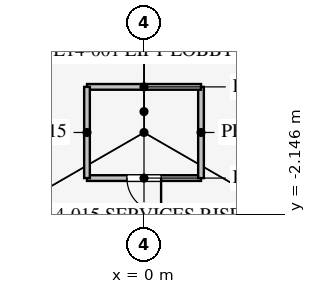
"""IFC4 building model, lengths in metres.
Left out: names, types, materials, properties, quantities, classifications, styles, units other than length and angle.
Written with IfcOpenShell. Run it as: python <this file> out.ifc"""

import sys

from ifc_helpers import new_model, si_unit, direction, frame, frame_2d, origin, place, context, subcontext, project, spatial, rectangle, extrude, element, fill, save


model = new_model("IFC4")
c1 = context("Model", 3, precision=1e-05, world=origin(), true_north=direction((0.0, 1.0)))
c2 = subcontext(c1, "Body", "Model", "MODEL_VIEW")
j1 = project(units=[si_unit("LENGTHUNIT", "METRE"), si_unit("PLANEANGLEUNIT", "RADIAN")], contexts=[c1])
p1 = place(None, origin())
s1 = spatial("IfcSite", under=j1, at=p1, CompositionType="ELEMENT")
p2 = place(p1, origin())
s2 = spatial("IfcBuilding", under=s1, at=p2, CompositionType="ELEMENT")
p3 = place(p2, frame((0.0, 0.0, 62.7)))
s3 = spatial("IfcBuildingStorey", under=s2, at=p3, CompositionType="ELEMENT", Elevation=62.7)
p4 = place(p3, frame((-1.5, -1.2, 0.0), z_axis=(0.0, 0.0, 1.0), x_axis=(1.0, 0.0, 0.0)))
e1 = element("IfcWall", 1, at=p4, inside=s3, PredefinedType="PARTITIONING", context=c2, shape_type="SweptSolid", body=[
    extrude(rectangle(XDim=3.0, YDim=0.15, at=frame_2d((1.5, 0.0))), origin(), (0.0, 0.0, 1.0), 4.0),
])
p5 = place(p4, frame((1.05, 0.0, 0.0)))
e2 = element("IfcOpeningElement", 2, at=p5, cuts=e1, PredefinedType="OPENING", context=c2, shape_type="SweptSolid", body=[
    extrude(rectangle(XDim=0.9, YDim=2.1, at=frame_2d((0.45, 1.05))), frame((0.0, 0.085, 0.0), z_axis=(0.0, -1.0, 0.0), x_axis=(1.0, 0.0, 0.0)), (0.0, 0.0, 1.0), 0.17),
])
p6 = place(p3, frame((1.5, -1.2, 0.0), z_axis=(0.0, 0.0, 1.0), x_axis=(0.0, 1.0, 0.0)))
e3 = element("IfcWall", 3, at=p6, inside=s3, PredefinedType="PARTITIONING", context=c2, shape_type="SweptSolid", body=[
    extrude(rectangle(XDim=2.4, YDim=0.15, at=frame_2d((1.2, 0.0))), origin(), (0.0, 0.0, 1.0), 4.0),
])
p7 = place(p3, frame((1.5, 1.2, 0.0), z_axis=(0.0, 0.0, 1.0), x_axis=(-1.0, 0.0, 0.0)))
e4 = element("IfcWall", 4, at=p7, inside=s3, PredefinedType="PARTITIONING", context=c2, shape_type="SweptSolid", body=[
    extrude(rectangle(XDim=3.0, YDim=0.15, at=frame_2d((1.5, 0.0))), origin(), (0.0, 0.0, 1.0), 4.0),
])
p8 = place(p3, frame((-1.5, 1.2, 0.0), z_axis=(0.0, 0.0, 1.0), x_axis=(0.0, -1.0, 0.0)))
e5 = element("IfcWall", 5, at=p8, inside=s3, PredefinedType="PARTITIONING", context=c2, shape_type="SweptSolid", body=[
    extrude(rectangle(XDim=2.4, YDim=0.15, at=frame_2d((1.2, 0.0))), origin(), (0.0, 0.0, 1.0), 4.0),
])
p9 = place(p3, frame((26.415, -15.231, 0.0), z_axis=(0.0, 0.0, 1.0), x_axis=(-0.50000091641, 0.866024874695, 0.0)))
e6 = element("IfcWall", 6, at=p9, inside=s3, PredefinedType="PARTITIONING", context=c2, shape_type="SweptSolid", body=[
    extrude(rectangle(XDim=52.796, YDim=0.12, at=frame_2d((26.398, 0.0))), origin(), (0.0, 0.0, 1.0), 2.9),
])
p10 = place(p9, frame((10.2, 0.0, 0.15)))
e7 = element("IfcOpeningElement", 7, at=p10, cuts=e6, PredefinedType="OPENING", context=c2, shape_type="SweptSolid", body=[
    extrude(rectangle(XDim=1.8, YDim=2.1, at=frame_2d((0.9, 1.05))), frame((0.0, 0.07, 0.0), z_axis=(0.0, -1.0, 0.0), x_axis=(1.0, 0.0, 0.0)), (0.0, 0.0, 1.0), 0.14),
])
p11 = place(p9, frame((40.8, 0.0, 0.15)))
e8 = element("IfcOpeningElement", 8, at=p11, cuts=e6, PredefinedType="OPENING", context=c2, shape_type="SweptSolid", body=[
    extrude(rectangle(XDim=1.8, YDim=2.1, at=frame_2d((0.9, 1.05))), frame((0.0, 0.07, 0.0), z_axis=(0.0, -1.0, 0.0), x_axis=(1.0, 0.0, 0.0)), (0.0, 0.0, 1.0), 0.14),
])
p12 = place(p5, frame((0.9, 0.0, 0.0), z_axis=(0.0, 0.0, 1.0), x_axis=(-1.0, 0.0, 0.0)))
e9 = element("IfcDoor", 9, at=p12, inside=s3, OperationType="SINGLE_SWING_LEFT", PredefinedType="DOOR", context=c2, shape_type="SweptSolid", body=[
    extrude(rectangle(XDim=0.9, YDim=2.1, at=frame_2d((0.45, 1.05))), frame((0.0, 0.025, 0.0), z_axis=(0.0, -1.0, 0.0), x_axis=(1.0, 0.0, 0.0)), (0.0, 0.0, 1.0), 0.05),
])
fill(e2, e9)
save(model, sys.argv[1])
